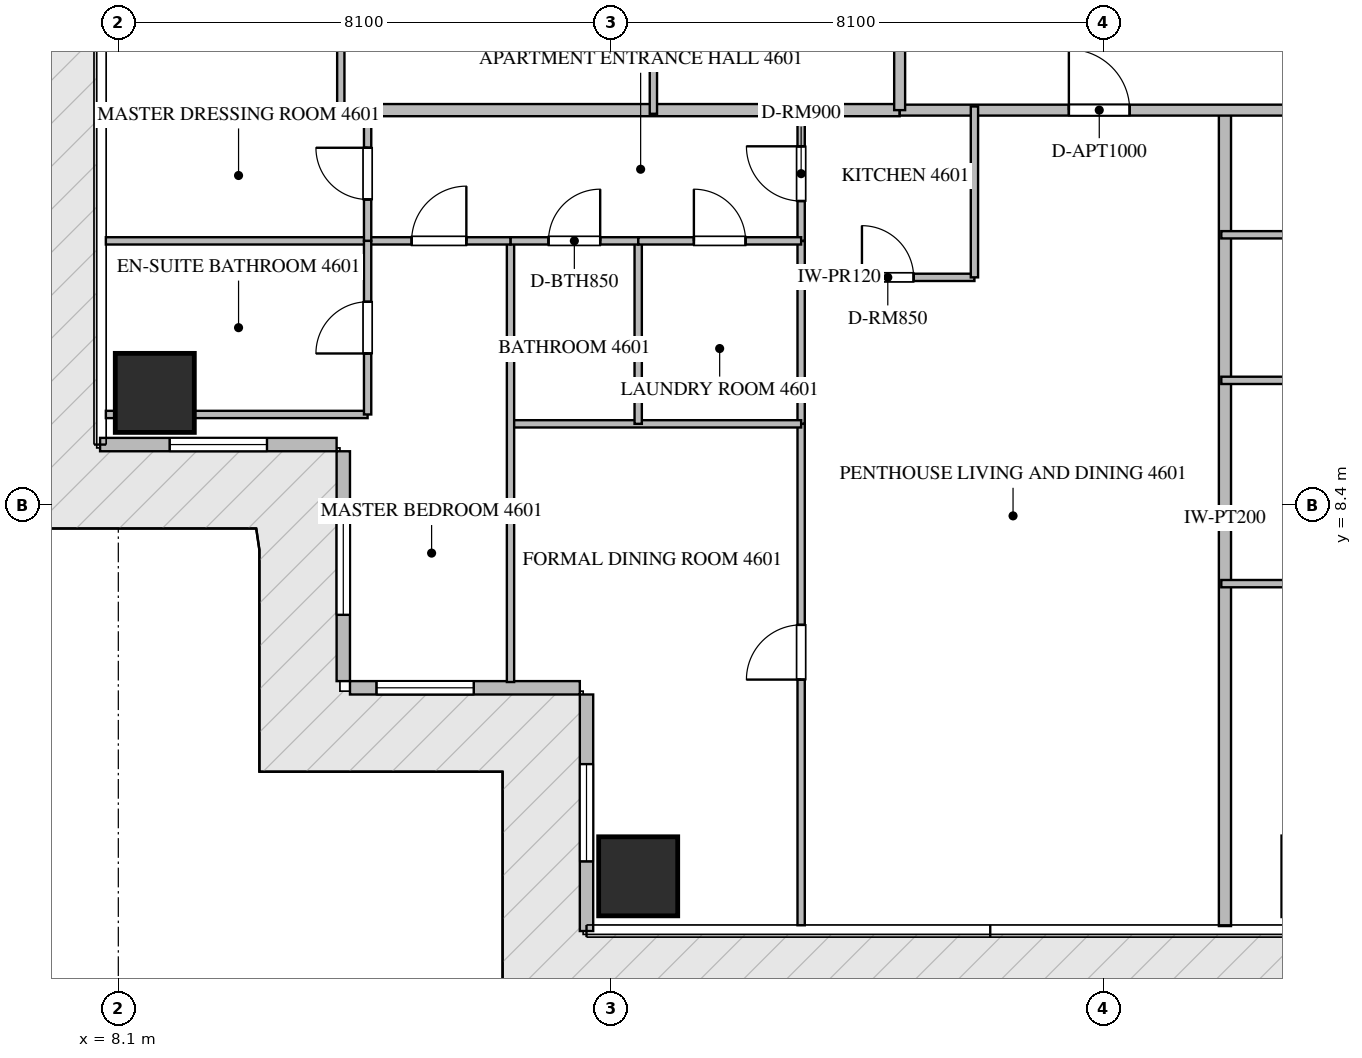
"""IFC4 building model, lengths in metres.
Left out: names, types, materials, properties, quantities, classifications, styles, units other than length and angle.
Written with IfcOpenShell. Run it as: python <this file> out.ifc"""

import sys

from ifc_helpers import new_model, si_unit, direction, frame, frame_2d, origin, origin_2d, place, context, subcontext, project, spatial, rectangle, extrude, source, transform, mapped, element, fill, save


model = new_model("IFC4")
c1 = context("Model", 3, precision=1e-05, world=origin(), true_north=direction((0.0, 1.0)))
c2 = subcontext(c1, "Body", "Model", "MODEL_VIEW")
j1 = project(units=[si_unit("LENGTHUNIT", "METRE"), si_unit("PLANEANGLEUNIT", "RADIAN")], contexts=[c1])
p1 = place(None, origin())
s1 = spatial("IfcSite", under=j1, at=p1, CompositionType="ELEMENT")
p2 = place(p1, origin())
s2 = spatial("IfcBuilding", under=s1, at=p2, CompositionType="ELEMENT")
p3 = place(p2, frame((0.0, 0.0, 183.9)))
s3 = spatial("IfcBuildingStorey", under=s2, at=p3, CompositionType="ELEMENT", Elevation=183.9)
m1 = source(origin(), c2, "Body", "SweptSolid", [
    extrude(rectangle(XDim=1.3, YDim=1.3, at=origin_2d()), origin(), (0.0, 0.0, 1.0), 3.75),
])
for number, where, z_axis, x_axis in (
    (1, (16.65, 2.3, -0.26), (0.0, 0.0, 1.0), (1.0, 0.0, 0.0)),
    (2, (8.7, 10.25, -0.26), (0.0, 0.0, 1.0), (1.0, 0.0, 0.0)),
):
    element("IfcColumn", number, at=place(p3, frame(where, z_axis=z_axis, x_axis=x_axis)), inside=s3, PredefinedType="COLUMN", context=c2, shape_type="MappedRepresentation", body=[
        mapped(m1, transform((0.0, 0.0, 0.0), scale=1.0)),
    ])
p4 = place(p3, frame((7.8, 9.4, 0.0), z_axis=(0.0, 0.0, 1.0), x_axis=(1.0, 0.0, 0.0)))
e3 = element("IfcWall", 3, at=p4, inside=s3, PredefinedType="ELEMENTEDWALL", context=c2, shape_type="SweptSolid", body=[
    extrude(rectangle(XDim=3.89, YDim=0.22, at=frame_2d((1.945, 0.0))), origin(), (0.0, 0.0, 1.0), 3.475),
])
p5 = place(p4, frame((1.145, 0.0, 0.65)))
e4 = element("IfcOpeningElement", 4, at=p5, cuts=e3, PredefinedType="OPENING", context=c2, shape_type="SweptSolid", body=[
    extrude(rectangle(XDim=1.6, YDim=2.1, at=frame_2d((0.8, 1.05))), frame((0.0, 0.12, 0.0), z_axis=(0.0, -1.0, 0.0), x_axis=(1.0, 0.0, 0.0)), (0.0, 0.0, 1.0), 0.24),
])
p6 = place(p3, frame((11.8, 9.29, 0.0), z_axis=(0.0, 0.0, 1.0), x_axis=(0.0, -1.0, 0.0)))
e5 = element("IfcWall", 5, at=p6, inside=s3, PredefinedType="ELEMENTEDWALL", context=c2, shape_type="SweptSolid", body=[
    extrude(rectangle(XDim=3.78, YDim=0.22, at=frame_2d((1.89, 0.0))), origin(), (0.0, 0.0, 1.0), 3.475),
])
p7 = place(p6, frame((1.09, 0.0, 0.65)))
e6 = element("IfcOpeningElement", 6, at=p7, cuts=e5, PredefinedType="OPENING", context=c2, shape_type="SweptSolid", body=[
    extrude(rectangle(XDim=1.6, YDim=2.1, at=frame_2d((0.8, 1.05))), frame((0.0, 0.12, 0.0), z_axis=(0.0, -1.0, 0.0), x_axis=(1.0, 0.0, 0.0)), (0.0, 0.0, 1.0), 0.24),
])
p8 = place(p3, frame((11.91, 5.4, 0.0), z_axis=(0.0, 0.0, 1.0), x_axis=(1.0, 0.0, 0.0)))
e7 = element("IfcWall", 7, at=p8, inside=s3, PredefinedType="ELEMENTEDWALL", context=c2, shape_type="SweptSolid", body=[
    extrude(rectangle(XDim=3.78, YDim=0.22, at=frame_2d((1.89, 0.0))), origin(), (0.0, 0.0, 1.0), 3.475),
])
p9 = place(p8, frame((0.436, 0.0, 0.65)))
e8 = element("IfcOpeningElement", 8, at=p9, cuts=e7, PredefinedType="OPENING", context=c2, shape_type="SweptSolid", body=[
    extrude(rectangle(XDim=1.6, YDim=2.1, at=frame_2d((0.8, 1.05))), frame((0.0, 0.12, 0.0), z_axis=(0.0, -1.0, 0.0), x_axis=(1.0, 0.0, 0.0)), (0.0, 0.0, 1.0), 0.24),
])
p10 = place(p3, frame((15.8, 5.29, 0.0), z_axis=(0.0, 0.0, 1.0), x_axis=(0.0, -1.0, 0.0)))
e9 = element("IfcWall", 9, at=p10, inside=s3, PredefinedType="ELEMENTEDWALL", context=c2, shape_type="SweptSolid", body=[
    extrude(rectangle(XDim=3.89, YDim=0.22, at=frame_2d((1.945, 0.0))), origin(), (0.0, 0.0, 1.0), 3.475),
])
p11 = place(p10, frame((1.145, 0.0, 0.65)))
e10 = element("IfcOpeningElement", 10, at=p11, cuts=e9, PredefinedType="OPENING", context=c2, shape_type="SweptSolid", body=[
    extrude(rectangle(XDim=1.6, YDim=2.1, at=frame_2d((0.8, 1.05))), frame((0.0, 0.12, 0.0), z_axis=(0.0, -1.0, 0.0), x_axis=(1.0, 0.0, 0.0)), (0.0, 0.0, 1.0), 0.24),
])
p12 = place(p3, frame((26.3, 1.482, 0.0), z_axis=(0.0, 0.0, 1.0), x_axis=(0.0, 1.0, 0.0)))
e11 = element("IfcWall", 11, at=p12, inside=s3, PredefinedType="PARTITIONING", context=c2, shape_type="SweptSolid", body=[
    extrude(rectangle(XDim=13.418, YDim=0.2, at=frame_2d((6.709, 0.0))), origin(), (0.0, 0.0, 1.0), 3.49),
])
p13 = place(p3, frame((7.882, 14.9, 0.0), z_axis=(0.0, 0.0, 1.0), x_axis=(1.0, 0.0, 0.0)))
e12 = element("IfcWall", 12, at=p13, inside=s3, PredefinedType="PARTITIONING", context=c2, shape_type="SweptSolid", body=[
    extrude(rectangle(XDim=13.068, YDim=0.2, at=frame_2d((6.534, 0.0))), origin(), (0.0, 0.0, 1.0), 3.49),
])
p14 = place(p3, frame((20.952, 14.9, 0.0), z_axis=(0.0, 0.0, 1.0), x_axis=(1.0, 0.0, 0.0)))
e13 = element("IfcWall", 13, at=p14, inside=s3, PredefinedType="PARTITIONING", context=c2, shape_type="SweptSolid", body=[
    extrude(rectangle(XDim=22.896, YDim=0.18, at=frame_2d((11.448, 0.0))), origin(), (0.0, 0.0, 1.0), 3.49),
])
p15 = place(p14, frame((2.781, 0.0, 0.0)))
e14 = element("IfcOpeningElement", 14, at=p15, cuts=e13, PredefinedType="OPENING", context=c2, shape_type="SweptSolid", body=[
    extrude(rectangle(XDim=1.0, YDim=2.15, at=frame_2d((0.5, 1.075))), frame((0.0, 0.1, 0.0), z_axis=(0.0, -1.0, 0.0), x_axis=(1.0, 0.0, 0.0)), (0.0, 0.0, 1.0), 0.2),
])
p16 = place(p14, frame((14.736, 0.0, 0.0)))
e15 = element("IfcOpeningElement", 15, at=p16, cuts=e13, PredefinedType="OPENING", context=c2, shape_type="SweptSolid", body=[
    extrude(rectangle(XDim=1.0, YDim=2.15, at=frame_2d((0.5, 1.075))), frame((0.0, 0.1, 0.0), z_axis=(0.0, -1.0, 0.0), x_axis=(1.0, 0.0, 0.0)), (0.0, 0.0, 1.0), 0.2),
])
p17 = place(p14, frame((19.115, 0.0, 0.0)))
e16 = element("IfcOpeningElement", 16, at=p17, cuts=e13, PredefinedType="OPENING", context=c2, shape_type="SweptSolid", body=[
    extrude(rectangle(XDim=1.0, YDim=2.15, at=frame_2d((0.5, 1.075))), frame((0.0, 0.1, 0.0), z_axis=(0.0, -1.0, 0.0), x_axis=(1.0, 0.0, 0.0)), (0.0, 0.0, 1.0), 0.2),
])
p18 = place(p3, frame((20.95, 14.9, 0.0), z_axis=(0.0, 0.0, 1.0), x_axis=(0.0, 1.0, 0.0)))
e17 = element("IfcWall", 17, at=p18, inside=s3, PredefinedType="PARTITIONING", context=c2, shape_type="SweptSolid", body=[
    extrude(rectangle(XDim=18.7, YDim=0.18, at=frame_2d((9.35, 0.0))), origin(), (0.0, 0.0, 1.0), 3.49),
])
p19 = place(p18, frame((14.603, 0.0, 0.0)))
e18 = element("IfcOpeningElement", 18, at=p19, cuts=e17, PredefinedType="OPENING", context=c2, shape_type="SweptSolid", body=[
    extrude(rectangle(XDim=1.0, YDim=2.15, at=frame_2d((0.5, 1.075))), frame((0.0, 0.1, 0.0), z_axis=(0.0, -1.0, 0.0), x_axis=(1.0, 0.0, 0.0)), (0.0, 0.0, 1.0), 0.2),
])
p20 = place(p3, frame((19.33, 12.15, 0.0), z_axis=(0.0, 0.0, 1.0), x_axis=(1.0, 0.0, 0.0)))
e19 = element("IfcWall", 19, at=p20, inside=s3, PredefinedType="PARTITIONING", context=c2, shape_type="SweptSolid", body=[
    extrude(rectangle(XDim=2.85, YDim=0.12, at=frame_2d((1.425, 0.0))), origin(), (0.0, 0.0, 1.0), 3.49),
])
p21 = place(p20, frame((1.0, 0.0, 0.0)))
e20 = element("IfcOpeningElement", 20, at=p21, cuts=e19, PredefinedType="OPENING", context=c2, shape_type="SweptSolid", body=[
    extrude(rectangle(XDim=0.85, YDim=2.1, at=frame_2d((0.425, 1.05))), frame((0.0, 0.07, 0.0), z_axis=(0.0, -1.0, 0.0), x_axis=(1.0, 0.0, 0.0)), (0.0, 0.0, 1.0), 0.14),
])
p22 = place(p3, frame((22.18, 12.15, 0.0), z_axis=(0.0, 0.0, 1.0), x_axis=(0.0, 1.0, 0.0)))
e21 = element("IfcWall", 21, at=p22, inside=s3, PredefinedType="PARTITIONING", context=c2, shape_type="SweptSolid", body=[
    extrude(rectangle(XDim=2.81, YDim=0.12, at=frame_2d((1.405, 0.0))), origin(), (0.0, 0.0, 1.0), 3.49),
])
p23 = place(p3, frame((19.33, 12.75, 0.0), z_axis=(0.0, 0.0, 1.0), x_axis=(0.0, 1.0, 0.0)))
e22 = element("IfcWall", 22, at=p23, inside=s3, PredefinedType="PARTITIONING", context=c2, shape_type="SweptSolid", body=[
    extrude(rectangle(XDim=2.21, YDim=0.12, at=frame_2d((1.105, 0.0))), origin(), (0.0, 0.0, 1.0), 3.49),
])
p24 = place(p23, frame((0.655, 0.0, 0.0)))
e23 = element("IfcOpeningElement", 23, at=p24, cuts=e22, PredefinedType="OPENING", context=c2, shape_type="SweptSolid", body=[
    extrude(rectangle(XDim=0.9, YDim=2.1, at=frame_2d((0.45, 1.05))), frame((0.0, 0.07, 0.0), z_axis=(0.0, -1.0, 0.0), x_axis=(1.0, 0.0, 0.0)), (0.0, 0.0, 1.0), 0.14),
])
p25 = place(p3, frame((19.33, 1.495, 0.0), z_axis=(0.0, 0.0, 1.0), x_axis=(0.0, 1.0, 0.0)))
e24 = element("IfcWall", 24, at=p25, inside=s3, PredefinedType="PARTITIONING", context=c2, shape_type="SweptSolid", body=[
    extrude(rectangle(XDim=8.246, YDim=0.12, at=frame_2d((4.123, 0.0))), origin(), (0.0, 0.0, 1.0), 3.49),
])
p26 = place(p25, frame((4.04, 0.0, 0.0)))
e25 = element("IfcOpeningElement", 25, at=p26, cuts=e24, PredefinedType="OPENING", context=c2, shape_type="SweptSolid", body=[
    extrude(rectangle(XDim=0.9, YDim=2.1, at=frame_2d((0.45, 1.05))), frame((0.0, 0.07, 0.0), z_axis=(0.0, -1.0, 0.0), x_axis=(1.0, 0.0, 0.0)), (0.0, 0.0, 1.0), 0.14),
])
p27 = place(p3, frame((19.33, 9.743, 0.0), z_axis=(0.0, 0.0, 1.0), x_axis=(0.0, 1.0, 0.0)))
e26 = element("IfcWall", 26, at=p27, inside=s3, PredefinedType="PARTITIONING", context=c2, shape_type="SweptSolid", body=[
    extrude(rectangle(XDim=3.005, YDim=0.12, at=frame_2d((1.502, 0.0))), origin(), (0.0, 0.0, 1.0), 3.49),
])
p28 = place(p3, frame((14.55, 9.741, 0.0), z_axis=(0.0, 0.0, 1.0), x_axis=(1.0, 0.0, 0.0)))
e27 = element("IfcWall", 27, at=p28, inside=s3, PredefinedType="PARTITIONING", context=c2, shape_type="SweptSolid", body=[
    extrude(rectangle(XDim=4.78, YDim=0.12, at=frame_2d((2.39, 0.0))), origin(), (0.0, 0.0, 1.0), 3.49),
])
p29 = place(p3, frame((14.55, 5.495, 0.0), z_axis=(0.0, 0.0, 1.0), x_axis=(0.0, 1.0, 0.0)))
e28 = element("IfcWall", 28, at=p29, inside=s3, PredefinedType="PARTITIONING", context=c2, shape_type="SweptSolid", body=[
    extrude(rectangle(XDim=7.255, YDim=0.12, at=frame_2d((3.627, 0.0))), origin(), (0.0, 0.0, 1.0), 3.49),
])
p30 = place(p3, frame((16.65, 9.741, 0.0), z_axis=(0.0, 0.0, 1.0), x_axis=(0.0, 1.0, 0.0)))
e29 = element("IfcWall", 29, at=p30, inside=s3, PredefinedType="PARTITIONING", context=c2, shape_type="SweptSolid", body=[
    extrude(rectangle(XDim=3.009, YDim=0.12, at=frame_2d((1.504, 0.0))), origin(), (0.0, 0.0, 1.0), 2.972),
])
p31 = place(p3, frame((14.55, 12.75, 0.0), z_axis=(0.0, 0.0, 1.0), x_axis=(1.0, 0.0, 0.0)))
e30 = element("IfcWall", 30, at=p31, inside=s3, PredefinedType="PARTITIONING", context=c2, shape_type="SweptSolid", body=[
    extrude(rectangle(XDim=2.1, YDim=0.12, at=frame_2d((1.05, 0.0))), origin(), (0.0, 0.0, 1.0), 3.49),
])
p32 = place(p31, frame((0.625, 0.0, 0.0)))
e31 = element("IfcOpeningElement", 31, at=p32, cuts=e30, PredefinedType="OPENING", context=c2, shape_type="SweptSolid", body=[
    extrude(rectangle(XDim=0.85, YDim=2.1, at=frame_2d((0.425, 1.05))), frame((0.0, 0.07, 0.0), z_axis=(0.0, -1.0, 0.0), x_axis=(1.0, 0.0, 0.0)), (0.0, 0.0, 1.0), 0.14),
])
p33 = place(p3, frame((16.652, 12.75, 0.0), z_axis=(0.0, 0.0, 1.0), x_axis=(1.0, 0.0, 0.0)))
e32 = element("IfcWall", 32, at=p33, inside=s3, PredefinedType="PARTITIONING", context=c2, shape_type="SweptSolid", body=[
    extrude(rectangle(XDim=2.678, YDim=0.12, at=frame_2d((1.339, 0.0))), origin(), (0.0, 0.0, 1.0), 3.49),
])
p34 = place(p33, frame((0.914, 0.0, 0.0)))
e33 = element("IfcOpeningElement", 33, at=p34, cuts=e32, PredefinedType="OPENING", context=c2, shape_type="SweptSolid", body=[
    extrude(rectangle(XDim=0.85, YDim=2.1, at=frame_2d((0.425, 1.05))), frame((0.0, 0.07, 0.0), z_axis=(0.0, -1.0, 0.0), x_axis=(1.0, 0.0, 0.0)), (0.0, 0.0, 1.0), 0.14),
])
p35 = place(p3, frame((12.2, 12.75, 0.0), z_axis=(0.0, 0.0, 1.0), x_axis=(1.0, 0.0, 0.0)))
e34 = element("IfcWall", 34, at=p35, inside=s3, PredefinedType="PARTITIONING", context=c2, shape_type="SweptSolid", body=[
    extrude(rectangle(XDim=2.348, YDim=0.12, at=frame_2d((1.174, 0.0))), origin(), (0.0, 0.0, 1.0), 3.49),
])
p36 = place(p35, frame((0.724, 0.0, 0.0)))
e35 = element("IfcOpeningElement", 35, at=p36, cuts=e34, PredefinedType="OPENING", context=c2, shape_type="SweptSolid", body=[
    extrude(rectangle(XDim=0.9, YDim=2.1, at=frame_2d((0.45, 1.05))), frame((0.0, 0.07, 0.0), z_axis=(0.0, -1.0, 0.0), x_axis=(1.0, 0.0, 0.0)), (0.0, 0.0, 1.0), 0.14),
])
p37 = place(p3, frame((7.895, 9.895, 0.0), z_axis=(0.0, 0.0, 1.0), x_axis=(1.0, 0.0, 0.0)))
e36 = element("IfcWall", 36, at=p37, inside=s3, PredefinedType="PARTITIONING", context=c2, shape_type="SweptSolid", body=[
    extrude(rectangle(XDim=4.305, YDim=0.12, at=frame_2d((2.152, 0.0))), origin(), (0.0, 0.0, 1.0), 3.49),
])
p38 = place(p3, frame((7.895, 12.75, 0.0), z_axis=(0.0, 0.0, 1.0), x_axis=(1.0, 0.0, 0.0)))
e37 = element("IfcWall", 37, at=p38, inside=s3, PredefinedType="PARTITIONING", context=c2, shape_type="SweptSolid", body=[
    extrude(rectangle(XDim=4.303, YDim=0.12, at=frame_2d((2.151, 0.0))), origin(), (0.0, 0.0, 1.0), 3.49),
])
p39 = place(p3, frame((12.2, 9.895, 0.0), z_axis=(0.0, 0.0, 1.0), x_axis=(0.0, 1.0, 0.0)))
e38 = element("IfcWall", 38, at=p39, inside=s3, PredefinedType="PARTITIONING", context=c2, shape_type="SweptSolid", body=[
    extrude(rectangle(XDim=2.855, YDim=0.12, at=frame_2d((1.427, 0.0))), origin(), (0.0, 0.0, 1.0), 3.49),
])
p40 = place(p39, frame((1.003, 0.0, 0.0)))
e39 = element("IfcOpeningElement", 39, at=p40, cuts=e38, PredefinedType="OPENING", context=c2, shape_type="SweptSolid", body=[
    extrude(rectangle(XDim=0.85, YDim=2.1, at=frame_2d((0.425, 1.05))), frame((0.0, 0.07, 0.0), z_axis=(0.0, -1.0, 0.0), x_axis=(1.0, 0.0, 0.0)), (0.0, 0.0, 1.0), 0.14),
])
p41 = place(p3, frame((12.2, 12.752, 0.0), z_axis=(0.0, 0.0, 1.0), x_axis=(0.0, 1.0, 0.0)))
e40 = element("IfcWall", 40, at=p41, inside=s3, PredefinedType="PARTITIONING", context=c2, shape_type="SweptSolid", body=[
    extrude(rectangle(XDim=2.208, YDim=0.12, at=frame_2d((1.104, 0.0))), origin(), (0.0, 0.0, 1.0), 3.49),
])
p42 = place(p41, frame((0.679, 0.0, 0.0)))
e41 = element("IfcOpeningElement", 41, at=p42, cuts=e40, PredefinedType="OPENING", context=c2, shape_type="SweptSolid", body=[
    extrude(rectangle(XDim=0.85, YDim=2.1, at=frame_2d((0.425, 1.05))), frame((0.0, 0.07, 0.0), z_axis=(0.0, -1.0, 0.0), x_axis=(1.0, 0.0, 0.0)), (0.0, 0.0, 1.0), 0.14),
])
p43 = place(p3, frame((26.24, 7.113, 0.0), z_axis=(0.0, 0.0, 1.0), x_axis=(1.0, 0.0, 0.0)))
e42 = element("IfcWall", 42, at=p43, inside=s3, PredefinedType="PARTITIONING", context=c2, shape_type="SweptSolid", body=[
    extrude(rectangle(XDim=7.62, YDim=0.12, at=frame_2d((3.81, 0.0))), origin(), (0.0, 0.0, 1.0), 3.49),
])
p44 = place(p3, frame((26.24, 10.456, 0.0), z_axis=(0.0, 0.0, 1.0), x_axis=(1.0, 0.0, 0.0)))
e43 = element("IfcWall", 43, at=p44, inside=s3, PredefinedType="PARTITIONING", context=c2, shape_type="SweptSolid", body=[
    extrude(rectangle(XDim=7.62, YDim=0.12, at=frame_2d((3.81, 0.0))), origin(), (0.0, 0.0, 1.0), 2.972),
])
p45 = place(p3, frame((26.24, 12.85, 0.0), z_axis=(0.0, 0.0, 1.0), x_axis=(1.0, 0.0, 0.0)))
e44 = element("IfcWall", 44, at=p45, inside=s3, PredefinedType="PARTITIONING", context=c2, shape_type="SweptSolid", body=[
    extrude(rectangle(XDim=7.62, YDim=0.12, at=frame_2d((3.81, 0.0))), origin(), (0.0, 0.0, 1.0), 3.49),
])
p46 = place(p3, frame((11.759, 14.84, 0.0), z_axis=(0.0, 0.0, 1.0), x_axis=(0.0, 1.0, 0.0)))
e45 = element("IfcWall", 45, at=p46, inside=s3, PredefinedType="PARTITIONING", context=c2, shape_type="SweptSolid", body=[
    extrude(rectangle(XDim=11.65, YDim=0.12, at=frame_2d((5.825, 0.0))), origin(), (0.0, 0.0, 1.0), 3.49),
])
p47 = place(p3, frame((16.9, 14.84, 0.0), z_axis=(0.0, 0.0, 1.0), x_axis=(0.0, 1.0, 0.0)))
e46 = element("IfcWall", 46, at=p47, inside=s3, PredefinedType="PARTITIONING", context=c2, shape_type="SweptSolid", body=[
    extrude(rectangle(XDim=11.65, YDim=0.12, at=frame_2d((5.825, 0.0))), origin(), (0.0, 0.0, 1.0), 2.972),
])
m2 = source(origin(), c2, "Body", "SweptSolid", [
    extrude(rectangle(XDim=1.6, YDim=2.1, at=frame_2d((0.8, 1.05))), frame((0.0, 0.03, 0.0), z_axis=(0.0, -1.0, 0.0), x_axis=(1.0, 0.0, 0.0)), (0.0, 0.0, 1.0), 0.06),
])
p48 = place(p5, origin())
e47 = element("IfcWindow", 47, at=p48, inside=s3, PartitioningType="SINGLE_PANEL", PredefinedType="WINDOW", context=c2, shape_type="MappedRepresentation", body=[
    mapped(m2, transform((0.0, 0.0, 0.0), scale=1.0)),
])
fill(e4, e47)
p49 = place(p7, origin())
e48 = element("IfcWindow", 48, at=p49, inside=s3, PartitioningType="SINGLE_PANEL", PredefinedType="WINDOW", context=c2, shape_type="MappedRepresentation", body=[
    mapped(m2, transform((0.0, 0.0, 0.0), scale=1.0)),
])
fill(e6, e48)
p50 = place(p9, origin())
e49 = element("IfcWindow", 49, at=p50, inside=s3, PartitioningType="SINGLE_PANEL", PredefinedType="WINDOW", context=c2, shape_type="MappedRepresentation", body=[
    mapped(m2, transform((0.0, 0.0, 0.0), scale=1.0)),
])
fill(e8, e49)
p51 = place(p11, origin())
e50 = element("IfcWindow", 50, at=p51, inside=s3, PartitioningType="SINGLE_PANEL", PredefinedType="WINDOW", context=c2, shape_type="MappedRepresentation", body=[
    mapped(m2, transform((0.0, 0.0, 0.0), scale=1.0)),
])
fill(e10, e50)
m3 = source(origin(), c2, "Body", "SweptSolid", [
    extrude(rectangle(XDim=1.0, YDim=2.15, at=frame_2d((0.5, 1.075))), frame((0.0, 0.025, 0.0), z_axis=(0.0, -1.0, 0.0), x_axis=(1.0, 0.0, 0.0)), (0.0, 0.0, 1.0), 0.05),
])
p52 = place(p15, origin())
e51 = element("IfcDoor", 51, at=p52, inside=s3, OperationType="SINGLE_SWING_LEFT", PredefinedType="DOOR", context=c2, shape_type="MappedRepresentation", body=[
    mapped(m3, transform((0.0, 0.0, 0.0), scale=1.0)),
])
fill(e14, e51)
m4 = source(origin(), c2, "Body", "SweptSolid", [
    extrude(rectangle(XDim=0.85, YDim=2.1, at=frame_2d((0.425, 1.05))), frame((0.0, 0.025, 0.0), z_axis=(0.0, -1.0, 0.0), x_axis=(1.0, 0.0, 0.0)), (0.0, 0.0, 1.0), 0.05),
])
p53 = place(p21, origin())
e52 = element("IfcDoor", 52, at=p53, inside=s3, OperationType="SINGLE_SWING_LEFT", PredefinedType="DOOR", context=c2, shape_type="MappedRepresentation", body=[
    mapped(m4, transform((0.0, 0.0, 0.0), scale=1.0)),
])
fill(e20, e52)
m5 = source(origin(), c2, "Body", "SweptSolid", [
    extrude(rectangle(XDim=0.9, YDim=2.1, at=frame_2d((0.45, 1.05))), frame((0.0, 0.025, 0.0), z_axis=(0.0, -1.0, 0.0), x_axis=(1.0, 0.0, 0.0)), (0.0, 0.0, 1.0), 0.05),
])
p54 = place(p24, origin())
e53 = element("IfcDoor", 53, at=p54, inside=s3, OperationType="SINGLE_SWING_RIGHT", PredefinedType="DOOR", context=c2, shape_type="MappedRepresentation", body=[
    mapped(m5, transform((0.0, 0.0, 0.0), scale=1.0)),
])
fill(e23, e53)
p55 = place(p26, origin())
e54 = element("IfcDoor", 54, at=p55, inside=s3, OperationType="SINGLE_SWING_LEFT", PredefinedType="DOOR", context=c2, shape_type="MappedRepresentation", body=[
    mapped(m5, transform((0.0, 0.0, 0.0), scale=1.0)),
])
fill(e25, e54)
p56 = place(p32, origin())
e55 = element("IfcDoor", 55, at=p56, inside=s3, OperationType="SINGLE_SWING_RIGHT", PredefinedType="DOOR", context=c2, shape_type="MappedRepresentation", body=[
    mapped(m4, transform((0.0, 0.0, 0.0), scale=1.0)),
])
fill(e31, e55)
p57 = place(p34, origin())
e56 = element("IfcDoor", 56, at=p57, inside=s3, OperationType="SINGLE_SWING_LEFT", PredefinedType="DOOR", context=c2, shape_type="MappedRepresentation", body=[
    mapped(m4, transform((0.0, 0.0, 0.0), scale=1.0)),
])
fill(e33, e56)
p58 = place(p36, origin())
e57 = element("IfcDoor", 57, at=p58, inside=s3, OperationType="SINGLE_SWING_RIGHT", PredefinedType="DOOR", context=c2, shape_type="MappedRepresentation", body=[
    mapped(m5, transform((0.0, 0.0, 0.0), scale=1.0)),
])
fill(e35, e57)
p59 = place(p40, origin())
e58 = element("IfcDoor", 58, at=p59, inside=s3, OperationType="SINGLE_SWING_LEFT", PredefinedType="DOOR", context=c2, shape_type="MappedRepresentation", body=[
    mapped(m4, transform((0.0, 0.0, 0.0), scale=1.0)),
])
fill(e39, e58)
p60 = place(p42, origin())
e59 = element("IfcDoor", 59, at=p60, inside=s3, OperationType="SINGLE_SWING_RIGHT", PredefinedType="DOOR", context=c2, shape_type="MappedRepresentation", body=[
    mapped(m4, transform((0.0, 0.0, 0.0), scale=1.0)),
])
fill(e41, e59)
save(model, sys.argv[1])
